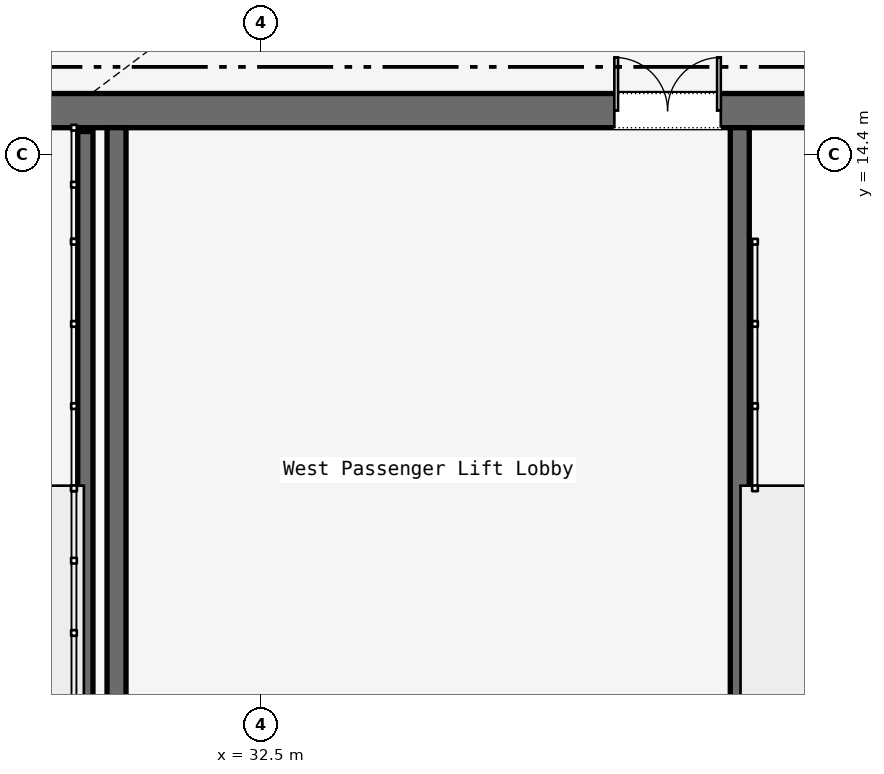
"""IFC4 building model, lengths in metres.
Left out: names, types, materials, properties, quantities, classifications, styles, units other than length and angle.
Written with IfcOpenShell. Run it as: python <this file> out.ifc"""

import sys

from ifc_helpers import new_model, si_unit, direction, frame, frame_2d, origin, place, context, subcontext, project, spatial, rectangle, extrude, element, fill, save


model = new_model("IFC4")
c1 = context("Model", 3, precision=1e-05, world=origin(), true_north=direction((0.0, 1.0)))
c2 = subcontext(c1, "Body", "Model", "MODEL_VIEW")
j1 = project(units=[si_unit("LENGTHUNIT", "METRE"), si_unit("PLANEANGLEUNIT", "RADIAN")], contexts=[c1])
p1 = place(None, origin())
s1 = spatial("IfcSite", under=j1, at=p1, CompositionType="ELEMENT")
p2 = place(p1, origin())
s2 = spatial("IfcBuilding", under=s1, at=p2, CompositionType="ELEMENT")
p3 = place(p2, frame((0.0, 0.0, -9.0)))
s3 = spatial("IfcBuildingStorey", under=s2, at=p3, CompositionType="ELEMENT", Elevation=-9.0)
p4 = place(p3, frame((26.45, 14.975, 0.0), z_axis=(0.0, 0.0, 1.0), x_axis=(1.0, 0.0, 0.0)))
e1 = element("IfcWall", 1, at=p4, inside=s3, PredefinedType="SOLIDWALL", context=c2, shape_type="SweptSolid", body=[
    extrude(rectangle(XDim=31.1, YDim=0.45, at=frame_2d((15.55, 0.0))), origin(), (0.0, 0.0, 1.0), 4.15),
])
p5 = place(p4, frame((1.65, 0.0, 0.0)))
e2 = element("IfcOpeningElement", 2, at=p5, cuts=e1, PredefinedType="OPENING", context=c2, shape_type="SweptSolid", body=[
    extrude(rectangle(XDim=1.1, YDim=2.2, at=frame_2d((0.55, 1.1))), frame((0.0, 0.225, 0.0), z_axis=(0.0, -1.0, 0.0), x_axis=(1.0, 0.0, 0.0)), (0.0, 0.0, 1.0), 0.45),
])
p6 = place(p4, frame((13.65, 0.0, 0.0)))
e3 = element("IfcOpeningElement", 3, at=p6, cuts=e1, PredefinedType="OPENING", context=c2, shape_type="SweptSolid", body=[
    extrude(rectangle(XDim=1.1, YDim=2.2, at=frame_2d((0.55, 1.1))), frame((0.0, 0.225, 0.0), z_axis=(0.0, -1.0, 0.0), x_axis=(1.0, 0.0, 0.0)), (0.0, 0.0, 1.0), 0.45),
])
p7 = place(p4, frame((25.55, 0.0, 0.0)))
e4 = element("IfcOpeningElement", 4, at=p7, cuts=e1, PredefinedType="OPENING", context=c2, shape_type="SweptSolid", body=[
    extrude(rectangle(XDim=1.1, YDim=2.2, at=frame_2d((0.55, 1.1))), frame((0.0, 0.225, 0.0), z_axis=(0.0, -1.0, 0.0), x_axis=(1.0, 0.0, 0.0)), (0.0, 0.0, 1.0), 0.45),
])
p8 = place(p4, frame((10.7, 0.0, 0.0)))
e5 = element("IfcOpeningElement", 5, at=p8, cuts=e1, PredefinedType="OPENING", context=c2, shape_type="SweptSolid", body=[
    extrude(rectangle(XDim=1.4, YDim=2.2, at=frame_2d((0.7, 1.1))), frame((0.0, 0.225, 0.0), z_axis=(0.0, -1.0, 0.0), x_axis=(1.0, 0.0, 0.0)), (0.0, 0.0, 1.0), 0.45),
])
p9 = place(p4, frame((19.35, 0.0, 0.0)))
e6 = element("IfcOpeningElement", 6, at=p9, cuts=e1, PredefinedType="OPENING", context=c2, shape_type="SweptSolid", body=[
    extrude(rectangle(XDim=1.1, YDim=2.2, at=frame_2d((0.55, 1.1))), frame((0.0, 0.225, 0.0), z_axis=(0.0, -1.0, 0.0), x_axis=(1.0, 0.0, 0.0)), (0.0, 0.0, 1.0), 0.45),
])
p10 = place(p4, frame((21.4, 0.0, 0.0)))
e7 = element("IfcOpeningElement", 7, at=p10, cuts=e1, PredefinedType="OPENING", context=c2, shape_type="SweptSolid", body=[
    extrude(rectangle(XDim=0.9, YDim=2.1, at=frame_2d((0.45, 1.05))), frame((0.0, 0.225, 0.0), z_axis=(0.0, -1.0, 0.0), x_axis=(1.0, 0.0, 0.0)), (0.0, 0.0, 1.0), 0.45),
])
p11 = place(p4, frame((23.35, 0.0, 0.0)))
e8 = element("IfcOpeningElement", 8, at=p11, cuts=e1, PredefinedType="OPENING", context=c2, shape_type="SweptSolid", body=[
    extrude(rectangle(XDim=1.3, YDim=2.3, at=frame_2d((0.65, 1.15))), frame((0.0, 0.225, 0.0), z_axis=(0.0, -1.0, 0.0), x_axis=(1.0, 0.0, 0.0)), (0.0, 0.0, 1.0), 0.45),
])
for number, where, z_axis, x_axis in (
    (9, (30.6, 5.85, 0.0), (0.0, 0.0, 1.0), (0.0, 1.0, 0.0)),
    (10, (38.8, 5.85, 0.0), (0.0, 0.0, 1.0), (0.0, 1.0, 0.0)),
):
    element("IfcWall", number, at=place(p3, frame(where, z_axis=z_axis, x_axis=x_axis)), inside=s3, PredefinedType="SOLIDWALL", context=c2, shape_type="SweptSolid", body=[
        extrude(rectangle(XDim=8.9, YDim=0.25, at=frame_2d((4.45, 0.0))), origin(), (0.0, 0.0, 1.0), 4.15),
    ])
p12 = place(p3, frame((30.19, 14.7, 0.0), z_axis=(0.0, 0.0, 1.0), x_axis=(0.0, -1.0, 0.0)))
e11 = element("IfcWall", 11, at=p12, inside=s3, PredefinedType="SOLIDWALL", context=c2, shape_type="SweptSolid", body=[
    extrude(rectangle(XDim=7.65, YDim=0.2, at=frame_2d((3.825, 0.0))), origin(), (0.0, 0.0, 1.0), 4.5),
])
p13 = place(p8, origin())
e12 = element("IfcDoor", 12, at=p13, inside=s3, OperationType="DOUBLE_DOOR_SINGLE_SWING", PredefinedType="DOOR", context=c2, shape_type="SweptSolid", body=[
    extrude(rectangle(XDim=1.4, YDim=2.2, at=frame_2d((0.7, 1.1))), frame((0.0, 0.025, 0.0), z_axis=(0.0, -1.0, 0.0), x_axis=(1.0, 0.0, 0.0)), (0.0, 0.0, 1.0), 0.05),
])
fill(e5, e12)
save(model, sys.argv[1])
